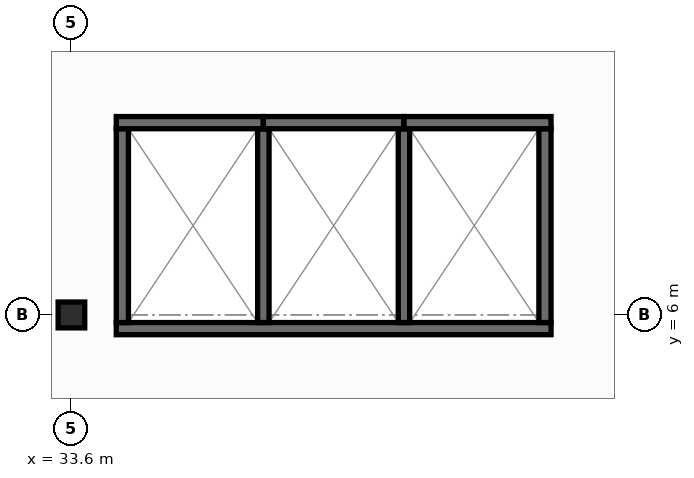
"""IFC4 building model, lengths in metres.
Left out: names, types, materials, properties, quantities, classifications, styles, units other than length and angle.
Written with IfcOpenShell. Run it as: python <this file> out.ifc"""

import sys

from ifc_helpers import new_model, si_unit, direction, frame, frame_2d, origin, origin_2d, place, context, subcontext, project, spatial, rectangle, i_section, extrude, element, save


model = new_model("IFC4")
c1 = context("Model", 3, precision=1e-05, world=origin(), true_north=direction((0.0, 1.0)))
c2 = subcontext(c1, "Body", "Model", "MODEL_VIEW")
j1 = project(units=[si_unit("LENGTHUNIT", "METRE"), si_unit("PLANEANGLEUNIT", "RADIAN")], contexts=[c1])
p1 = place(None, origin())
s1 = spatial("IfcSite", under=j1, at=p1, CompositionType="ELEMENT")
p2 = place(p1, origin())
s2 = spatial("IfcBuilding", under=s1, at=p2, CompositionType="ELEMENT")
p3 = place(p2, frame((0.0, 0.0, 34.35)))
s3 = spatial("IfcBuildingStorey", under=s2, at=p3, CompositionType="ELEMENT", Elevation=34.35)
p4 = place(p3, frame((33.6, 6.0, 0.0), z_axis=(0.0, 0.0, 1.0), x_axis=(1.0, 0.0, 0.0)))
e1 = element("IfcColumn", 1, at=p4, inside=s3, PredefinedType="COLUMN", context=c2, shape_type="SweptSolid", body=[
    extrude(i_section(OverallWidth=0.35, OverallDepth=0.34, WebThickness=0.016, FlangeThickness=0.028, at=origin_2d()), origin(), (0.0, 0.0, 1.0), 3.95),
])
p5 = place(p3, frame((34.19, 5.82, 0.0), z_axis=(0.0, 0.0, 1.0), x_axis=(1.0, 0.0, 0.0)))
e2 = element("IfcWall", 2, at=p5, inside=s3, PredefinedType="SHEAR", context=c2, shape_type="SweptSolid", body=[
    extrude(rectangle(XDim=5.72, YDim=0.16, at=frame_2d((2.86, 0.0))), origin(), (0.0, 0.0, 1.0), 3.71),
])
for number, where, z_axis, x_axis in (
    (3, (34.27, 5.9, 0.0), (0.0, 0.0, 1.0), (0.0, 1.0, 0.0)),
    (4, (39.83, 5.9, 0.0), (0.0, 0.0, 1.0), (0.0, 1.0, 0.0)),
):
    element("IfcWall", number, at=place(p3, frame(where, z_axis=z_axis, x_axis=x_axis)), inside=s3, PredefinedType="SHEAR", context=c2, shape_type="SweptSolid", body=[
        extrude(rectangle(XDim=2.55, YDim=0.16, at=frame_2d((1.275, 0.0))), origin(), (0.0, 0.0, 1.0), 3.71),
    ])
for number, where, z_axis, x_axis in (
    (5, (36.125, 5.9, 0.0), (0.0, 0.0, 1.0), (0.0, 1.0, 0.0)),
    (6, (37.975, 5.9, 0.0), (0.0, 0.0, 1.0), (0.0, 1.0, 0.0)),
):
    element("IfcWall", number, at=place(p3, frame(where, z_axis=z_axis, x_axis=x_axis)), inside=s3, PredefinedType="SHEAR", context=c2, shape_type="SweptSolid", body=[
        extrude(rectangle(XDim=2.55, YDim=0.15, at=frame_2d((1.275, 0.0))), origin(), (0.0, 0.0, 1.0), 3.71),
    ])
p6 = place(p3, frame((34.19, 8.53, 0.0), z_axis=(0.0, 0.0, 1.0), x_axis=(1.0, 0.0, 0.0)))
e7 = element("IfcWall", 7, at=p6, inside=s3, PredefinedType="SHEAR", context=c2, shape_type="SweptSolid", body=[
    extrude(rectangle(XDim=1.935, YDim=0.16, at=frame_2d((0.968, 0.0))), origin(), (0.0, 0.0, 1.0), 3.71),
])
p7 = place(p3, frame((36.125, 8.53, 0.0), z_axis=(0.0, 0.0, 1.0), x_axis=(1.0, 0.0, 0.0)))
e8 = element("IfcWall", 8, at=p7, inside=s3, PredefinedType="SHEAR", context=c2, shape_type="SweptSolid", body=[
    extrude(rectangle(XDim=1.85, YDim=0.16, at=frame_2d((0.925, 0.0))), origin(), (0.0, 0.0, 1.0), 3.71),
])
p8 = place(p3, frame((37.975, 8.53, 0.0), z_axis=(0.0, 0.0, 1.0), x_axis=(1.0, 0.0, 0.0)))
e9 = element("IfcWall", 9, at=p8, inside=s3, PredefinedType="SHEAR", context=c2, shape_type="SweptSolid", body=[
    extrude(rectangle(XDim=1.935, YDim=0.16, at=frame_2d((0.967, 0.0))), origin(), (0.0, 0.0, 1.0), 3.71),
])
save(model, sys.argv[1])
